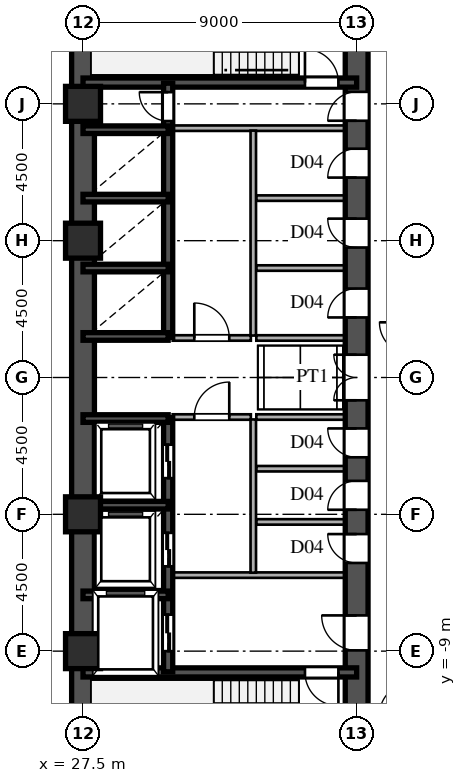
"""IFC4 building model, lengths in metres.
Left out: names, types, materials, properties, quantities, classifications, styles, units other than length and angle.
Written with IfcOpenShell. Run it as: python <this file> out.ifc"""

import sys

from ifc_helpers import new_model, si_unit, direction, frame, frame_2d, origin, origin_2d, place, context, subcontext, project, spatial, rectangle, hollow_rectangle, extrude, source, transform, mapped, element, fill, save


model = new_model("IFC4")
c1 = context("Model", 3, precision=1e-05, world=origin(), true_north=direction((0.0, 1.0)))
c2 = subcontext(c1, "Body", "Model", "MODEL_VIEW")
j1 = project(units=[si_unit("LENGTHUNIT", "METRE"), si_unit("PLANEANGLEUNIT", "RADIAN")], contexts=[c1])
p1 = place(None, origin())
s1 = spatial("IfcSite", under=j1, at=p1, CompositionType="ELEMENT")
p2 = place(p1, origin())
s2 = spatial("IfcBuilding", under=s1, at=p2, CompositionType="ELEMENT")
p3 = place(p2, frame((0.0, 0.0, 54.9)))
s3 = spatial("IfcBuildingStorey", under=s2, at=p3, CompositionType="ELEMENT", Elevation=54.9)
m1 = source(origin(), c2, "Body", "SweptSolid", [
    extrude(hollow_rectangle(XDim=1.15, YDim=1.15, WallThickness=0.048, at=origin_2d()), origin(), (0.0, 0.0, 1.0), 3.6),
])
for number, where, z_axis, x_axis in (
    (1, (27.5, -9.0, 0.0), (0.0, 0.0, 1.0), (1.0, 0.0, 0.0)),
    (2, (27.5, -4.5, 0.0), (0.0, 0.0, 1.0), (1.0, 0.0, 0.0)),
    (3, (27.5, 4.5, 0.0), (0.0, 0.0, 1.0), (1.0, 0.0, 0.0)),
    (4, (27.5, 9.0, 0.0), (0.0, 0.0, 1.0), (1.0, 0.0, 0.0)),
):
    element("IfcColumn", number, at=place(p3, frame(where, z_axis=z_axis, x_axis=x_axis)), inside=s3, PredefinedType="COLUMN", context=c2, shape_type="MappedRepresentation", body=[
        mapped(m1, transform((0.0, 0.0, 0.0), scale=1.0)),
    ])
for number, where, z_axis, x_axis in (
    (5, (27.5, -13.5, 0.0), (0.0, 0.0, 1.0), (0.0, 1.0, 0.0)),
    (6, (27.5, 1.3, 0.0), (0.0, 0.0, 1.0), (0.0, 1.0, 0.0)),
):
    element("IfcWall", number, at=place(p3, frame(where, z_axis=z_axis, x_axis=x_axis)), inside=s3, PredefinedType="SHEAR", context=c2, shape_type="SweptSolid", body=[
        extrude(rectangle(XDim=12.2, YDim=0.75, at=frame_2d((6.1, 0.0))), origin(), (0.0, 0.0, 1.0), 3.38),
    ])
p4 = place(p3, frame((27.5, -1.3, 0.0), z_axis=(0.0, 0.0, 1.0), x_axis=(0.0, 1.0, 0.0)))
e7 = element("IfcWall", 7, at=p4, inside=s3, PredefinedType="SHEAR", context=c2, shape_type="SweptSolid", body=[
    extrude(rectangle(XDim=2.6, YDim=0.75, at=frame_2d((1.3, 0.0))), origin(), (0.0, 0.0, 1.0), 3.38),
])
p5 = place(p3, frame((36.5, -13.65, 0.0), z_axis=(0.0, 0.0, 1.0), x_axis=(0.0, 1.0, 0.0)))
e8 = element("IfcWall", 8, at=p5, inside=s3, PredefinedType="SHEAR", context=c2, shape_type="SweptSolid", body=[
    extrude(rectangle(XDim=7.15, YDim=0.75, at=frame_2d((3.575, 0.0))), origin(), (0.0, 0.0, 1.0), 3.38),
])
p6 = place(p5, frame((4.675, 0.0, 0.0)))
e9 = element("IfcOpeningElement", 9, at=p6, cuts=e8, PredefinedType="OPENING", context=c2, shape_type="SweptSolid", body=[
    extrude(rectangle(XDim=1.15, YDim=2.2, at=frame_2d((0.575, 1.1))), frame((0.0, 0.385, 0.0), z_axis=(0.0, -1.0, 0.0), x_axis=(1.0, 0.0, 0.0)), (0.0, 0.0, 1.0), 0.77),
])
p7 = place(p3, frame((36.5, -1.3, 0.0), z_axis=(0.0, 0.0, 1.0), x_axis=(0.0, 1.0, 0.0)))
e10 = element("IfcWall", 10, at=p7, inside=s3, PredefinedType="SHEAR", context=c2, shape_type="SweptSolid", body=[
    extrude(rectangle(XDim=2.6, YDim=0.75, at=frame_2d((1.3, 0.0))), origin(), (0.0, 0.0, 1.0), 3.38),
])
p8 = place(p7, frame((0.55, 0.0, 0.0)))
e11 = element("IfcOpeningElement", 11, at=p8, cuts=e10, PredefinedType="OPENING", context=c2, shape_type="SweptSolid", body=[
    extrude(rectangle(XDim=1.5, YDim=2.3, at=frame_2d((0.75, 1.15))), frame((0.0, 0.385, 0.0), z_axis=(0.0, -1.0, 0.0), x_axis=(1.0, 0.0, 0.0)), (0.0, 0.0, 1.0), 0.77),
])
p9 = place(p3, frame((36.5, 8.2, 0.0), z_axis=(0.0, 0.0, 1.0), x_axis=(0.0, 1.0, 0.0)))
e12 = element("IfcWall", 12, at=p9, inside=s3, PredefinedType="SHEAR", context=c2, shape_type="SweptSolid", body=[
    extrude(rectangle(XDim=5.45, YDim=0.75, at=frame_2d((2.725, 0.0))), origin(), (0.0, 0.0, 1.0), 3.38),
])
p10 = place(p9, frame((0.245, 0.0, 0.0)))
e13 = element("IfcOpeningElement", 13, at=p10, cuts=e12, PredefinedType="OPENING", context=c2, shape_type="SweptSolid", body=[
    extrude(rectangle(XDim=0.95, YDim=2.15, at=frame_2d((0.475, 1.075))), frame((0.0, 0.385, 0.0), z_axis=(0.0, -1.0, 0.0), x_axis=(1.0, 0.0, 0.0)), (0.0, 0.0, 1.0), 0.77),
])
p11 = place(p3, frame((36.5, -6.5, 0.0), z_axis=(0.0, 0.0, 1.0), x_axis=(0.0, 1.0, 0.0)))
e14 = element("IfcWall", 14, at=p11, inside=s3, PredefinedType="SHEAR", context=c2, shape_type="SweptSolid", body=[
    extrude(rectangle(XDim=1.75, YDim=0.75, at=frame_2d((0.875, 0.0))), origin(), (0.0, 0.0, 1.0), 3.38),
])
p12 = place(p11, frame((0.4, 0.0, 0.0)))
e15 = element("IfcOpeningElement", 15, at=p12, cuts=e14, PredefinedType="OPENING", context=c2, shape_type="SweptSolid", body=[
    extrude(rectangle(XDim=0.95, YDim=2.15, at=frame_2d((0.475, 1.075))), frame((0.0, 0.385, 0.0), z_axis=(0.0, -1.0, 0.0), x_axis=(1.0, 0.0, 0.0)), (0.0, 0.0, 1.0), 0.77),
])
p13 = place(p3, frame((36.5, -4.75, 0.0), z_axis=(0.0, 0.0, 1.0), x_axis=(0.0, 1.0, 0.0)))
e16 = element("IfcWall", 16, at=p13, inside=s3, PredefinedType="SHEAR", context=c2, shape_type="SweptSolid", body=[
    extrude(rectangle(XDim=1.75, YDim=0.75, at=frame_2d((0.875, 0.0))), origin(), (0.0, 0.0, 1.0), 3.38),
])
p14 = place(p13, frame((0.4, 0.0, 0.0)))
e17 = element("IfcOpeningElement", 17, at=p14, cuts=e16, PredefinedType="OPENING", context=c2, shape_type="SweptSolid", body=[
    extrude(rectangle(XDim=0.95, YDim=2.15, at=frame_2d((0.475, 1.075))), frame((0.0, 0.385, 0.0), z_axis=(0.0, -1.0, 0.0), x_axis=(1.0, 0.0, 0.0)), (0.0, 0.0, 1.0), 0.77),
])
p15 = place(p3, frame((36.5, -3.0, 0.0), z_axis=(0.0, 0.0, 1.0), x_axis=(0.0, 1.0, 0.0)))
e18 = element("IfcWall", 18, at=p15, inside=s3, PredefinedType="SHEAR", context=c2, shape_type="SweptSolid", body=[
    extrude(rectangle(XDim=1.7, YDim=0.75, at=frame_2d((0.85, 0.0))), origin(), (0.0, 0.0, 1.0), 3.38),
])
p16 = place(p15, frame((0.375, 0.0, 0.0)))
e19 = element("IfcOpeningElement", 19, at=p16, cuts=e18, PredefinedType="OPENING", context=c2, shape_type="SweptSolid", body=[
    extrude(rectangle(XDim=0.95, YDim=2.15, at=frame_2d((0.475, 1.075))), frame((0.0, 0.385, 0.0), z_axis=(0.0, -1.0, 0.0), x_axis=(1.0, 0.0, 0.0)), (0.0, 0.0, 1.0), 0.77),
])
p17 = place(p3, frame((36.5, 1.3, 0.0), z_axis=(0.0, 0.0, 1.0), x_axis=(0.0, 1.0, 0.0)))
e20 = element("IfcWall", 20, at=p17, inside=s3, PredefinedType="SHEAR", context=c2, shape_type="SweptSolid", body=[
    extrude(rectangle(XDim=2.3, YDim=0.75, at=frame_2d((1.15, 0.0))), origin(), (0.0, 0.0, 1.0), 3.38),
])
p18 = place(p17, frame((0.675, 0.0, 0.0)))
e21 = element("IfcOpeningElement", 21, at=p18, cuts=e20, PredefinedType="OPENING", context=c2, shape_type="SweptSolid", body=[
    extrude(rectangle(XDim=0.95, YDim=2.15, at=frame_2d((0.475, 1.075))), frame((0.0, 0.385, 0.0), z_axis=(0.0, -1.0, 0.0), x_axis=(1.0, 0.0, 0.0)), (0.0, 0.0, 1.0), 0.77),
])
p19 = place(p3, frame((36.5, 3.6, 0.0), z_axis=(0.0, 0.0, 1.0), x_axis=(0.0, 1.0, 0.0)))
e22 = element("IfcWall", 22, at=p19, inside=s3, PredefinedType="SHEAR", context=c2, shape_type="SweptSolid", body=[
    extrude(rectangle(XDim=2.3, YDim=0.75, at=frame_2d((1.15, 0.0))), origin(), (0.0, 0.0, 1.0), 3.38),
])
p20 = place(p19, frame((0.675, 0.0, 0.0)))
e23 = element("IfcOpeningElement", 23, at=p20, cuts=e22, PredefinedType="OPENING", context=c2, shape_type="SweptSolid", body=[
    extrude(rectangle(XDim=0.95, YDim=2.15, at=frame_2d((0.475, 1.075))), frame((0.0, 0.385, 0.0), z_axis=(0.0, -1.0, 0.0), x_axis=(1.0, 0.0, 0.0)), (0.0, 0.0, 1.0), 0.77),
])
p21 = place(p3, frame((36.5, 5.9, 0.0), z_axis=(0.0, 0.0, 1.0), x_axis=(0.0, 1.0, 0.0)))
e24 = element("IfcWall", 24, at=p21, inside=s3, PredefinedType="SHEAR", context=c2, shape_type="SweptSolid", body=[
    extrude(rectangle(XDim=2.3, YDim=0.75, at=frame_2d((1.15, 0.0))), origin(), (0.0, 0.0, 1.0), 3.38),
])
p22 = place(p21, frame((0.675, 0.0, 0.0)))
e25 = element("IfcOpeningElement", 25, at=p22, cuts=e24, PredefinedType="OPENING", context=c2, shape_type="SweptSolid", body=[
    extrude(rectangle(XDim=0.95, YDim=2.15, at=frame_2d((0.475, 1.075))), frame((0.0, 0.385, 0.0), z_axis=(0.0, -1.0, 0.0), x_axis=(1.0, 0.0, 0.0)), (0.0, 0.0, 1.0), 0.77),
])
p23 = place(p3, frame((27.5, -9.7, 0.0), z_axis=(0.0, 0.0, 1.0), x_axis=(1.0, 0.0, 0.0)))
e26 = element("IfcWall", 26, at=p23, inside=s3, PredefinedType="SHEAR", context=c2, shape_type="SweptSolid", body=[
    extrude(rectangle(XDim=9.0, YDim=0.3, at=frame_2d((4.5, 0.0))), origin(), (0.0, 0.0, 1.0), 3.38),
])
p24 = place(p23, frame((7.3, 0.0, 0.0)))
e27 = element("IfcOpeningElement", 27, at=p24, cuts=e26, PredefinedType="OPENING", context=c2, shape_type="SweptSolid", body=[
    extrude(rectangle(XDim=1.1, YDim=2.2, at=frame_2d((0.55, 1.1))), frame((0.0, 0.16, 0.0), z_axis=(0.0, -1.0, 0.0), x_axis=(1.0, 0.0, 0.0)), (0.0, 0.0, 1.0), 0.32),
])
p25 = place(p3, frame((27.5, 9.7, 0.0), z_axis=(0.0, 0.0, 1.0), x_axis=(1.0, 0.0, 0.0)))
e28 = element("IfcWall", 28, at=p25, inside=s3, PredefinedType="SHEAR", context=c2, shape_type="SweptSolid", body=[
    extrude(rectangle(XDim=9.0, YDim=0.3, at=frame_2d((4.5, 0.0))), origin(), (0.0, 0.0, 1.0), 3.38),
])
p26 = place(p25, frame((7.3, 0.0, 0.0)))
e29 = element("IfcOpeningElement", 29, at=p26, cuts=e28, PredefinedType="OPENING", context=c2, shape_type="SweptSolid", body=[
    extrude(rectangle(XDim=1.1, YDim=2.2, at=frame_2d((0.55, 1.1))), frame((0.0, 0.16, 0.0), z_axis=(0.0, -1.0, 0.0), x_axis=(1.0, 0.0, 0.0)), (0.0, 0.0, 1.0), 0.32),
])
for number, where, z_axis, x_axis in (
    (30, (27.5, -7.15, 0.0), (0.0, 0.0, 1.0), (1.0, 0.0, 0.0)),
    (31, (27.5, -4.2, 0.0), (0.0, 0.0, 1.0), (1.0, 0.0, 0.0)),
    (32, (27.5, -1.35, 0.0), (0.0, 0.0, 1.0), (1.0, 0.0, 0.0)),
    (33, (27.5, 1.35, 0.0), (0.0, 0.0, 1.0), (1.0, 0.0, 0.0)),
    (34, (27.5, 3.6, 0.0), (0.0, 0.0, 1.0), (1.0, 0.0, 0.0)),
    (35, (27.5, 5.9, 0.0), (0.0, 0.0, 1.0), (1.0, 0.0, 0.0)),
    (36, (27.5, 8.15, 0.0), (0.0, 0.0, 1.0), (1.0, 0.0, 0.0)),
):
    element("IfcWall", number, at=place(p3, frame(where, z_axis=z_axis, x_axis=x_axis)), inside=s3, PredefinedType="SHEAR", context=c2, shape_type="SweptSolid", body=[
        extrude(rectangle(XDim=2.8, YDim=0.25, at=frame_2d((1.4, 0.0))), origin(), (0.0, 0.0, 1.0), 3.38),
    ])
p27 = place(p3, frame((30.3, -9.68, 0.0), z_axis=(0.0, 0.0, 1.0), x_axis=(0.0, 1.0, 0.0)))
e37 = element("IfcWall", 37, at=p27, inside=s3, PredefinedType="SHEAR", context=c2, shape_type="SweptSolid", body=[
    extrude(rectangle(XDim=2.56, YDim=0.3, at=frame_2d((1.28, 0.0))), origin(), (0.0, 0.0, 1.0), 3.38),
])
p28 = place(p27, frame((0.68, 0.0, 0.0)))
e38 = element("IfcOpeningElement", 38, at=p28, cuts=e37, PredefinedType="OPENING", context=c2, shape_type="SweptSolid", body=[
    extrude(rectangle(XDim=1.2, YDim=2.25, at=frame_2d((0.6, 1.125))), frame((0.0, 0.16, 0.0), z_axis=(0.0, -1.0, 0.0), x_axis=(1.0, 0.0, 0.0)), (0.0, 0.0, 1.0), 0.32),
])
p29 = place(p3, frame((30.3, -7.12, 0.0), z_axis=(0.0, 0.0, 1.0), x_axis=(0.0, 1.0, 0.0)))
e39 = element("IfcWall", 39, at=p29, inside=s3, PredefinedType="SHEAR", context=c2, shape_type="SweptSolid", body=[
    extrude(rectangle(XDim=2.92, YDim=0.3, at=frame_2d((1.46, 0.0))), origin(), (0.0, 0.0, 1.0), 3.38),
])
p30 = place(p29, frame((0.91, 0.0, 0.0)))
e40 = element("IfcOpeningElement", 40, at=p30, cuts=e39, PredefinedType="OPENING", context=c2, shape_type="SweptSolid", body=[
    extrude(rectangle(XDim=1.1, YDim=2.2, at=frame_2d((0.55, 1.1))), frame((0.0, 0.16, 0.0), z_axis=(0.0, -1.0, 0.0), x_axis=(1.0, 0.0, 0.0)), (0.0, 0.0, 1.0), 0.32),
])
p31 = place(p3, frame((30.3, -4.2, 0.0), z_axis=(0.0, 0.0, 1.0), x_axis=(0.0, 1.0, 0.0)))
e41 = element("IfcWall", 41, at=p31, inside=s3, PredefinedType="SHEAR", context=c2, shape_type="SweptSolid", body=[
    extrude(rectangle(XDim=2.88, YDim=0.3, at=frame_2d((1.44, 0.0))), origin(), (0.0, 0.0, 1.0), 3.38),
])
p32 = place(p31, frame((0.89, 0.0, 0.0)))
e42 = element("IfcOpeningElement", 42, at=p32, cuts=e41, PredefinedType="OPENING", context=c2, shape_type="SweptSolid", body=[
    extrude(rectangle(XDim=1.1, YDim=2.2, at=frame_2d((0.55, 1.1))), frame((0.0, 0.16, 0.0), z_axis=(0.0, -1.0, 0.0), x_axis=(1.0, 0.0, 0.0)), (0.0, 0.0, 1.0), 0.32),
])
p33 = place(p3, frame((30.3, 1.32, 0.0), z_axis=(0.0, 0.0, 1.0), x_axis=(0.0, 1.0, 0.0)))
e43 = element("IfcWall", 43, at=p33, inside=s3, PredefinedType="SHEAR", context=c2, shape_type="SweptSolid", body=[
    extrude(rectangle(XDim=2.28, YDim=0.3, at=frame_2d((1.14, 0.0))), origin(), (0.0, 0.0, 1.0), 3.38),
])
p34 = place(p3, frame((30.3, 3.6, 0.0), z_axis=(0.0, 0.0, 1.0), x_axis=(0.0, 1.0, 0.0)))
e44 = element("IfcWall", 44, at=p34, inside=s3, PredefinedType="SHEAR", context=c2, shape_type="SweptSolid", body=[
    extrude(rectangle(XDim=2.3, YDim=0.3, at=frame_2d((1.15, 0.0))), origin(), (0.0, 0.0, 1.0), 3.38),
])
p35 = place(p3, frame((30.3, 5.9, 0.0), z_axis=(0.0, 0.0, 1.0), x_axis=(0.0, 1.0, 0.0)))
e45 = element("IfcWall", 45, at=p35, inside=s3, PredefinedType="SHEAR", context=c2, shape_type="SweptSolid", body=[
    extrude(rectangle(XDim=2.25, YDim=0.3, at=frame_2d((1.125, 0.0))), origin(), (0.0, 0.0, 1.0), 3.38),
])
p36 = place(p3, frame((30.3, 8.15, 0.0), z_axis=(0.0, 0.0, 1.0), x_axis=(0.0, 1.0, 0.0)))
e46 = element("IfcWall", 46, at=p36, inside=s3, PredefinedType="SHEAR", context=c2, shape_type="SweptSolid", body=[
    extrude(rectangle(XDim=1.53, YDim=0.3, at=frame_2d((0.765, 0.0))), origin(), (0.0, 0.0, 1.0), 3.38),
])
p37 = place(p36, frame((0.285, 0.0, 0.0)))
e47 = element("IfcOpeningElement", 47, at=p37, cuts=e46, PredefinedType="OPENING", context=c2, shape_type="SweptSolid", body=[
    extrude(rectangle(XDim=0.95, YDim=2.15, at=frame_2d((0.475, 1.075))), frame((0.0, 0.16, 0.0), z_axis=(0.0, -1.0, 0.0), x_axis=(1.0, 0.0, 0.0)), (0.0, 0.0, 1.0), 0.32),
])
for number, where, z_axis, x_axis in (
    (48, (30.45, -6.5, 0.0), (0.0, 0.0, 1.0), (1.0, 0.0, 0.0)),
    (49, (30.45, 8.2, 0.0), (0.0, 0.0, 1.0), (1.0, 0.0, 0.0)),
):
    element("IfcWall", number, at=place(p3, frame(where, z_axis=z_axis, x_axis=x_axis)), inside=s3, PredefinedType="PARTITIONING", context=c2, shape_type="SweptSolid", body=[
        extrude(rectangle(XDim=5.7, YDim=0.18, at=frame_2d((2.85, 0.0))), origin(), (0.0, 0.0, 1.0), 3.38),
    ])
p38 = place(p3, frame((33.1, -6.42, 0.0), z_axis=(0.0, 0.0, 1.0), x_axis=(0.0, 1.0, 0.0)))
e50 = element("IfcWall", 50, at=p38, inside=s3, PredefinedType="PARTITIONING", context=c2, shape_type="SweptSolid", body=[
    extrude(rectangle(XDim=5.04, YDim=0.18, at=frame_2d((2.52, 0.0))), origin(), (0.0, 0.0, 1.0), 3.38),
])
p39 = place(p3, frame((33.1, 1.38, 0.0), z_axis=(0.0, 0.0, 1.0), x_axis=(0.0, 1.0, 0.0)))
e51 = element("IfcWall", 51, at=p39, inside=s3, PredefinedType="PARTITIONING", context=c2, shape_type="SweptSolid", body=[
    extrude(rectangle(XDim=6.74, YDim=0.18, at=frame_2d((3.37, 0.0))), origin(), (0.0, 0.0, 1.0), 3.38),
])
p40 = place(p3, frame((30.45, -1.3, 0.0), z_axis=(0.0, 0.0, 1.0), x_axis=(1.0, 0.0, 0.0)))
e52 = element("IfcWall", 52, at=p40, inside=s3, PredefinedType="PARTITIONING", context=c2, shape_type="SweptSolid", body=[
    extrude(rectangle(XDim=2.57, YDim=0.18, at=frame_2d((1.285, 0.0))), origin(), (0.0, 0.0, 1.0), 3.38),
])
p41 = place(p40, frame((0.71, 0.0, 0.0)))
e53 = element("IfcOpeningElement", 53, at=p41, cuts=e52, PredefinedType="OPENING", context=c2, shape_type="SweptSolid", body=[
    extrude(rectangle(XDim=1.15, YDim=2.2, at=frame_2d((0.575, 1.1))), frame((0.0, 0.1, 0.0), z_axis=(0.0, -1.0, 0.0), x_axis=(1.0, 0.0, 0.0)), (0.0, 0.0, 1.0), 0.2),
])
p42 = place(p3, frame((30.45, 1.3, 0.0), z_axis=(0.0, 0.0, 1.0), x_axis=(1.0, 0.0, 0.0)))
e54 = element("IfcWall", 54, at=p42, inside=s3, PredefinedType="PARTITIONING", context=c2, shape_type="SweptSolid", body=[
    extrude(rectangle(XDim=2.57, YDim=0.18, at=frame_2d((1.285, 0.0))), origin(), (0.0, 0.0, 1.0), 3.38),
])
p43 = place(p42, frame((0.71, 0.0, 0.0)))
e55 = element("IfcOpeningElement", 55, at=p43, cuts=e54, PredefinedType="OPENING", context=c2, shape_type="SweptSolid", body=[
    extrude(rectangle(XDim=1.15, YDim=2.2, at=frame_2d((0.575, 1.1))), frame((0.0, 0.1, 0.0), z_axis=(0.0, -1.0, 0.0), x_axis=(1.0, 0.0, 0.0)), (0.0, 0.0, 1.0), 0.2),
])
for number, where, z_axis, x_axis in (
    (56, (33.2, -1.3, 0.0), (0.0, 0.0, 1.0), (1.0, 0.0, 0.0)),
    (57, (33.2, 1.3, 0.0), (0.0, 0.0, 1.0), (1.0, 0.0, 0.0)),
    (58, (33.2, -4.75, 0.0), (0.0, 0.0, 1.0), (1.0, 0.0, 0.0)),
    (59, (33.2, -3.0, 0.0), (0.0, 0.0, 1.0), (1.0, 0.0, 0.0)),
    (60, (33.2, 3.6, 0.0), (0.0, 0.0, 1.0), (1.0, 0.0, 0.0)),
    (61, (33.2, 5.9, 0.0), (0.0, 0.0, 1.0), (1.0, 0.0, 0.0)),
):
    element("IfcWall", number, at=place(p3, frame(where, z_axis=z_axis, x_axis=x_axis)), inside=s3, PredefinedType="PARTITIONING", context=c2, shape_type="SweptSolid", body=[
        extrude(rectangle(XDim=2.95, YDim=0.18, at=frame_2d((1.475, 0.0))), origin(), (0.0, 0.0, 1.0), 3.38),
    ])
m2 = source(origin(), c2, "Body", "SweptSolid", [
    extrude(rectangle(XDim=1.15, YDim=2.2, at=frame_2d((0.575, 1.1))), frame((0.0, 0.025, 0.0), z_axis=(0.0, -1.0, 0.0), x_axis=(1.0, 0.0, 0.0)), (0.0, 0.0, 1.0), 0.05),
])
p44 = place(p6, origin())
e62 = element("IfcDoor", 62, at=p44, inside=s3, OperationType="SINGLE_SWING_RIGHT", PredefinedType="DOOR", context=c2, shape_type="MappedRepresentation", body=[
    mapped(m2, transform((0.0, 0.0, 0.0), scale=1.0)),
])
fill(e9, e62)
m3 = source(origin(), c2, "Body", "SweptSolid", [
    extrude(rectangle(XDim=1.5, YDim=2.3, at=frame_2d((0.75, 1.15))), frame((0.0, 0.025, 0.0), z_axis=(0.0, -1.0, 0.0), x_axis=(1.0, 0.0, 0.0)), (0.0, 0.0, 1.0), 0.05),
])
p45 = place(p8, origin())
e63 = element("IfcDoor", 63, at=p45, inside=s3, OperationType="DOUBLE_SWING_LEFT", PredefinedType="DOOR", context=c2, shape_type="MappedRepresentation", body=[
    mapped(m3, transform((0.0, 0.0, 0.0), scale=1.0)),
])
fill(e11, e63)
m4 = source(origin(), c2, "Body", "SweptSolid", [
    extrude(rectangle(XDim=0.95, YDim=2.15, at=frame_2d((0.475, 1.075))), frame((0.0, 0.025, 0.0), z_axis=(0.0, -1.0, 0.0), x_axis=(1.0, 0.0, 0.0)), (0.0, 0.0, 1.0), 0.05),
])
p46 = place(p10, origin())
e64 = element("IfcDoor", 64, at=p46, inside=s3, OperationType="SINGLE_SWING_LEFT", PredefinedType="DOOR", context=c2, shape_type="MappedRepresentation", body=[
    mapped(m4, transform((0.0, 0.0, 0.0), scale=1.0)),
])
fill(e13, e64)
p47 = place(p12, origin())
e65 = element("IfcDoor", 65, at=p47, inside=s3, OperationType="SINGLE_SWING_RIGHT", PredefinedType="DOOR", context=c2, shape_type="MappedRepresentation", body=[
    mapped(m4, transform((0.0, 0.0, 0.0), scale=1.0)),
])
fill(e15, e65)
p48 = place(p14, origin())
e66 = element("IfcDoor", 66, at=p48, inside=s3, OperationType="SINGLE_SWING_LEFT", PredefinedType="DOOR", context=c2, shape_type="MappedRepresentation", body=[
    mapped(m4, transform((0.0, 0.0, 0.0), scale=1.0)),
])
fill(e17, e66)
p49 = place(p16, origin())
e67 = element("IfcDoor", 67, at=p49, inside=s3, OperationType="SINGLE_SWING_RIGHT", PredefinedType="DOOR", context=c2, shape_type="MappedRepresentation", body=[
    mapped(m4, transform((0.0, 0.0, 0.0), scale=1.0)),
])
fill(e19, e67)
p50 = place(p18, origin())
e68 = element("IfcDoor", 68, at=p50, inside=s3, OperationType="SINGLE_SWING_LEFT", PredefinedType="DOOR", context=c2, shape_type="MappedRepresentation", body=[
    mapped(m4, transform((0.0, 0.0, 0.0), scale=1.0)),
])
fill(e21, e68)
p51 = place(p20, origin())
e69 = element("IfcDoor", 69, at=p51, inside=s3, OperationType="SINGLE_SWING_RIGHT", PredefinedType="DOOR", context=c2, shape_type="MappedRepresentation", body=[
    mapped(m4, transform((0.0, 0.0, 0.0), scale=1.0)),
])
fill(e23, e69)
p52 = place(p22, origin())
e70 = element("IfcDoor", 70, at=p52, inside=s3, OperationType="SINGLE_SWING_LEFT", PredefinedType="DOOR", context=c2, shape_type="MappedRepresentation", body=[
    mapped(m4, transform((0.0, 0.0, 0.0), scale=1.0)),
])
fill(e25, e70)
m5 = source(origin(), c2, "Body", "SweptSolid", [
    extrude(rectangle(XDim=1.1, YDim=2.2, at=frame_2d((0.55, 1.1))), frame((0.0, 0.025, 0.0), z_axis=(0.0, -1.0, 0.0), x_axis=(1.0, 0.0, 0.0)), (0.0, 0.0, 1.0), 0.05),
])
p53 = place(p24, frame((1.1, 0.0, 0.0), z_axis=(0.0, 0.0, 1.0), x_axis=(-1.0, 0.0, 0.0)))
e71 = element("IfcDoor", 71, at=p53, inside=s3, OperationType="SINGLE_SWING_RIGHT", PredefinedType="DOOR", context=c2, shape_type="MappedRepresentation", body=[
    mapped(m5, transform((0.0, 0.0, 0.0), scale=1.0)),
])
fill(e27, e71)
p54 = place(p26, origin())
e72 = element("IfcDoor", 72, at=p54, inside=s3, OperationType="SINGLE_SWING_LEFT", PredefinedType="DOOR", context=c2, shape_type="MappedRepresentation", body=[
    mapped(m5, transform((0.0, 0.0, 0.0), scale=1.0)),
])
fill(e29, e72)
m6 = source(origin(), c2, "Body", "SweptSolid", [
    extrude(rectangle(XDim=1.2, YDim=2.25, at=frame_2d((0.6, 1.125))), frame((0.0, 0.025, 0.0), z_axis=(0.0, -1.0, 0.0), x_axis=(1.0, 0.0, 0.0)), (0.0, 0.0, 1.0), 0.05),
])
p55 = place(p28, origin())
e73 = element("IfcDoor", 73, at=p55, inside=s3, OperationType="DOUBLE_DOOR_SLIDING", PredefinedType="DOOR", context=c2, shape_type="MappedRepresentation", body=[
    mapped(m6, transform((0.0, 0.0, 0.0), scale=1.0)),
])
fill(e38, e73)
m7 = source(origin(), c2, "Body", "SweptSolid", [
    extrude(rectangle(XDim=1.1, YDim=2.2, at=frame_2d((0.55, 1.1))), frame((0.0, 0.025, 0.0), z_axis=(0.0, -1.0, 0.0), x_axis=(1.0, 0.0, 0.0)), (0.0, 0.0, 1.0), 0.05),
])
p56 = place(p30, origin())
e74 = element("IfcDoor", 74, at=p56, inside=s3, OperationType="DOUBLE_DOOR_SLIDING", PredefinedType="DOOR", context=c2, shape_type="MappedRepresentation", body=[
    mapped(m7, transform((0.0, 0.0, 0.0), scale=1.0)),
])
fill(e40, e74)
p57 = place(p32, origin())
e75 = element("IfcDoor", 75, at=p57, inside=s3, OperationType="DOUBLE_DOOR_SLIDING", PredefinedType="DOOR", context=c2, shape_type="MappedRepresentation", body=[
    mapped(m7, transform((0.0, 0.0, 0.0), scale=1.0)),
])
fill(e42, e75)
p58 = place(p37, origin())
e76 = element("IfcDoor", 76, at=p58, inside=s3, OperationType="SINGLE_SWING_RIGHT", PredefinedType="DOOR", context=c2, shape_type="MappedRepresentation", body=[
    mapped(m4, transform((0.0, 0.0, 0.0), scale=1.0)),
])
fill(e47, e76)
p59 = place(p41, origin())
e77 = element("IfcDoor", 77, at=p59, inside=s3, OperationType="SINGLE_SWING_RIGHT", PredefinedType="DOOR", context=c2, shape_type="MappedRepresentation", body=[
    mapped(m2, transform((0.0, 0.0, 0.0), scale=1.0)),
])
fill(e53, e77)
p60 = place(p43, origin())
e78 = element("IfcDoor", 78, at=p60, inside=s3, OperationType="SINGLE_SWING_LEFT", PredefinedType="DOOR", context=c2, shape_type="MappedRepresentation", body=[
    mapped(m2, transform((0.0, 0.0, 0.0), scale=1.0)),
])
fill(e55, e78)
save(model, sys.argv[1])
